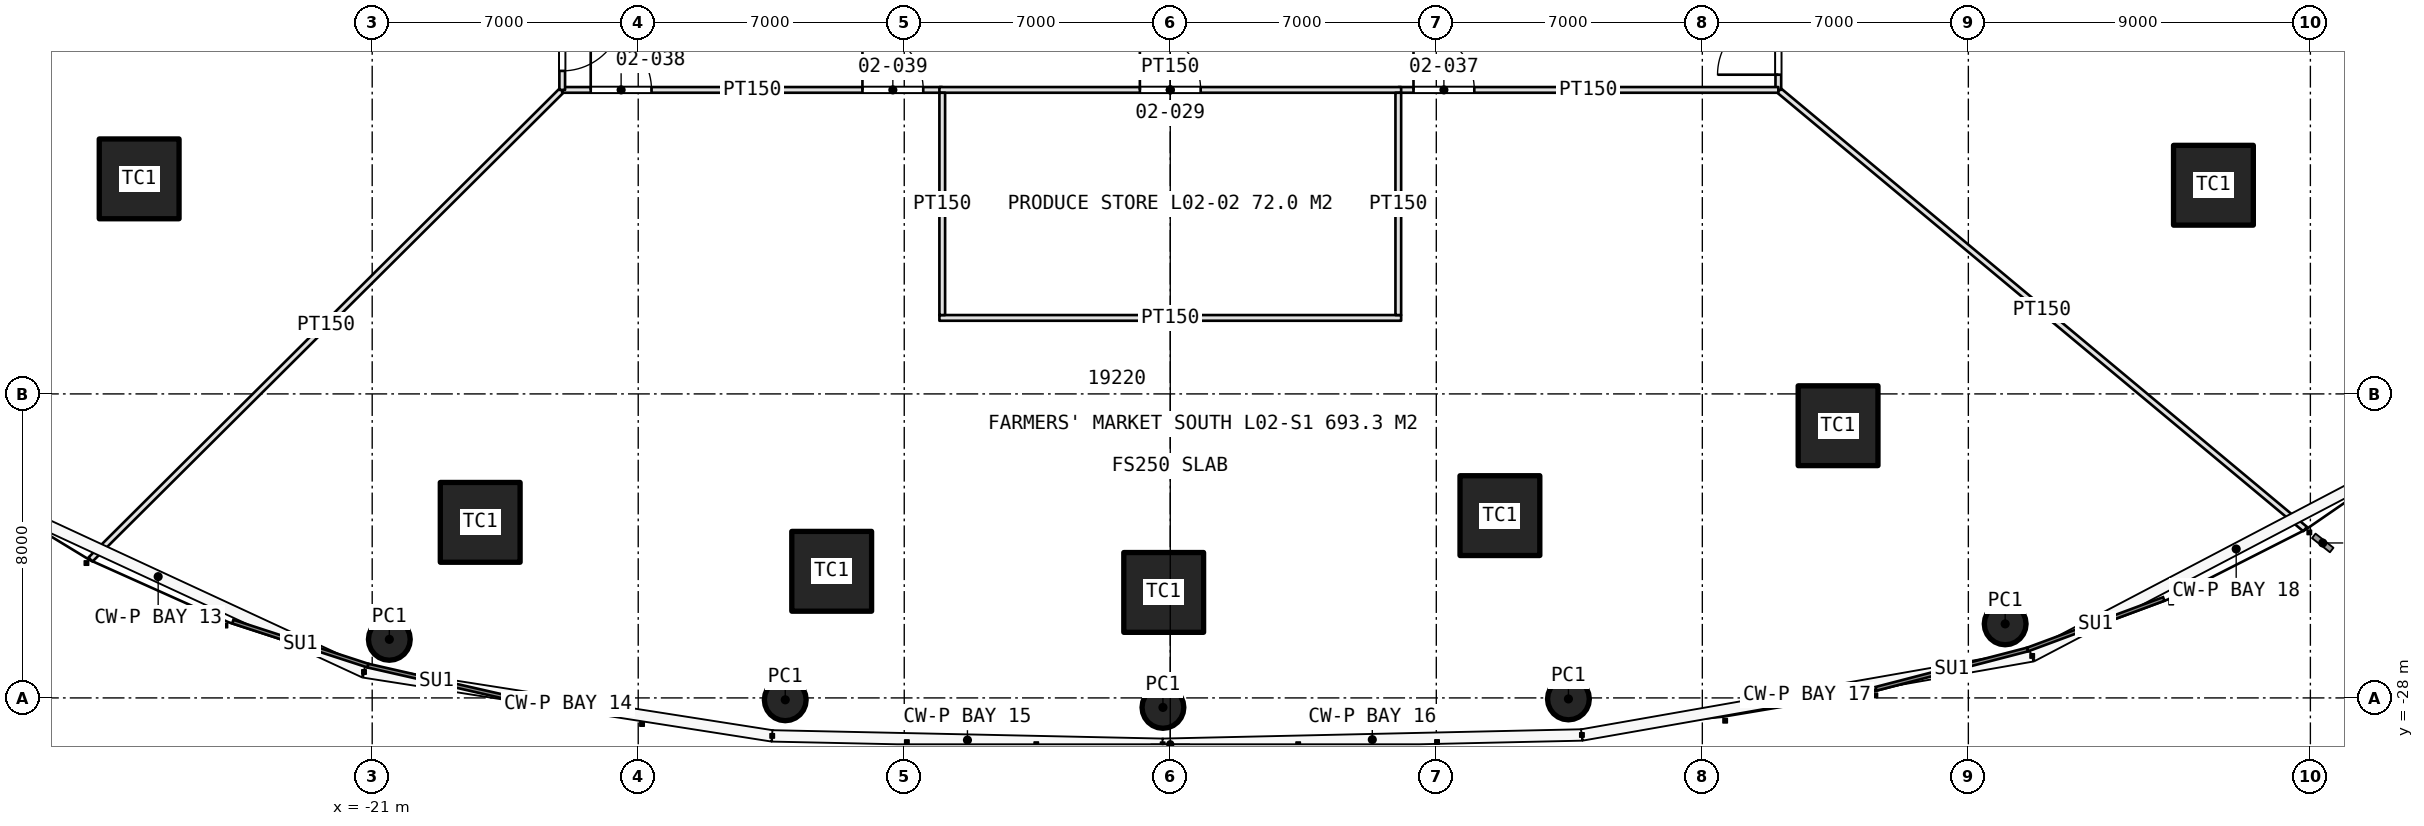
"""IFC4 building model, lengths in metres.
Left out: names, types, materials, properties, quantities, classifications, styles, units other than length and angle.
Written with IfcOpenShell. Run it as: python <this file> out.ifc"""

import sys

from ifc_helpers import new_model, si_unit, direction, frame, frame_2d, origin, origin_2d, place, context, subcontext, project, spatial, rectangle, circle, extrude, element, fill, save


model = new_model("IFC4")
c1 = context("Model", 3, precision=1e-05, world=origin(), true_north=direction((0.0, 1.0)))
c2 = subcontext(c1, "Body", "Model", "MODEL_VIEW")
j1 = project(units=[si_unit("LENGTHUNIT", "METRE"), si_unit("PLANEANGLEUNIT", "RADIAN")], contexts=[c1])
p1 = place(None, origin())
s1 = spatial("IfcSite", under=j1, at=p1, CompositionType="ELEMENT")
p2 = place(p1, origin())
s2 = spatial("IfcBuilding", under=s1, at=p2, CompositionType="ELEMENT")
p3 = place(p2, frame((0.0, 0.0, 10.0)))
s3 = spatial("IfcBuildingStorey", under=s2, at=p3, CompositionType="ELEMENT", Elevation=10.0)
for number, where, z_axis, x_axis in (
    (1, (-27.132, -14.341, 0.0), (0.0, 0.0, 1.0), (1.0, 0.0, 0.0)),
    (2, (-18.158, -23.38, 0.0), (0.0, 0.0, 1.0), (1.0, 0.0, 0.0)),
    (3, (-8.909, -24.668, 0.0), (0.0, 0.0, 1.0), (1.0, 0.0, 0.0)),
    (4, (-0.173, -25.224, 0.0), (0.0, 0.0, 1.0), (1.0, 0.0, 0.0)),
    (5, (8.674, -23.203, 0.0), (0.0, 0.0, 1.0), (1.0, 0.0, 0.0)),
    (6, (17.572, -20.837, 0.0), (0.0, 0.0, 1.0), (1.0, 0.0, 0.0)),
    (7, (27.449, -14.509, 0.0), (0.0, 0.0, 1.0), (1.0, 0.0, 0.0)),
):
    element("IfcColumn", number, at=place(p3, frame(where, z_axis=z_axis, x_axis=x_axis)), inside=s3, PredefinedType="COLUMN", context=c2, shape_type="SweptSolid", body=[
        extrude(rectangle(XDim=2.1, YDim=2.1, at=origin_2d()), origin(), (0.0, 0.0, 1.0), 5.0),
    ])
for number, where, z_axis, x_axis in (
    (8, (-20.549, -26.459, 0.0), (0.0, 0.0, 1.0), (1.0, 0.0, 0.0)),
    (9, (-10.131, -28.05, 0.0), (0.0, 0.0, 1.0), (1.0, 0.0, 0.0)),
    (10, (-0.193, -28.25, 0.0), (0.0, 0.0, 1.0), (1.0, 0.0, 0.0)),
    (11, (10.477, -28.027, 0.0), (0.0, 0.0, 1.0), (1.0, 0.0, 0.0)),
    (12, (21.969, -26.052, 0.0), (0.0, 0.0, 1.0), (1.0, 0.0, 0.0)),
):
    element("IfcColumn", number, at=place(p3, frame(where, z_axis=z_axis, x_axis=x_axis)), inside=s3, PredefinedType="COLUMN", context=c2, shape_type="SweptSolid", body=[
        extrude(circle(Radius=0.55, at=origin_2d()), origin(), (0.0, 0.0, 1.0), 5.0),
    ])
p4 = place(p3, frame((-16.014, -12.014, 0.0), z_axis=(0.0, 0.0, 1.0), x_axis=(-0.708660986583, -0.705549152147, 0.0)))
e13 = element("IfcWall", 13, at=p4, inside=s3, PredefinedType="PARTITIONING", context=c2, shape_type="SweptSolid", body=[
    extrude(rectangle(XDim=17.496, YDim=0.15, at=frame_2d((8.748, 0.0))), origin(), (0.0, 0.0, 1.0), 3.8),
])
p5 = place(p3, frame((16.015, -12.013, 0.0), z_axis=(0.0, 0.0, 1.0), x_axis=(0.768089154528, -0.640342916488, 0.0)))
e14 = element("IfcWall", 14, at=p5, inside=s3, PredefinedType="PARTITIONING", context=c2, shape_type="SweptSolid", body=[
    extrude(rectangle(XDim=18.026, YDim=0.15, at=frame_2d((9.013, 0.0))), origin(), (0.0, 0.0, 1.0), 3.8),
])
p6 = place(p3, frame((16.0, -12.0, 0.0), z_axis=(0.0, 0.0, 1.0), x_axis=(0.0, 1.0, 0.0)))
e15 = element("IfcWall", 15, at=p6, inside=s3, PredefinedType="PARTITIONING", context=c2, shape_type="SweptSolid", body=[
    extrude(rectangle(XDim=24.0, YDim=0.15, at=frame_2d((12.0, 0.0))), origin(), (0.0, 0.0, 1.0), 3.8),
])
p7 = place(p6, frame((10.4, 0.0, 0.0)))
e16 = element("IfcOpeningElement", 16, at=p7, cuts=e15, PredefinedType="OPENING", context=c2, shape_type="SweptSolid", body=[
    extrude(rectangle(XDim=1.6, YDim=2.4, at=frame_2d((0.8, 1.2))), frame((0.0, 0.085, 0.0), z_axis=(0.0, -1.0, 0.0), x_axis=(1.0, 0.0, 0.0)), (0.0, 0.0, 1.0), 0.17),
])
p8 = place(p6, frame((21.9, 0.0, 0.0)))
e17 = element("IfcOpeningElement", 17, at=p8, cuts=e15, PredefinedType="OPENING", context=c2, shape_type="SweptSolid", body=[
    extrude(rectangle(XDim=1.6, YDim=2.4, at=frame_2d((0.8, 1.2))), frame((0.0, 0.085, 0.0), z_axis=(0.0, -1.0, 0.0), x_axis=(1.0, 0.0, 0.0)), (0.0, 0.0, 1.0), 0.17),
])
p9 = place(p6, frame((0.4, 0.0, 0.0)))
e18 = element("IfcOpeningElement", 18, at=p9, cuts=e15, PredefinedType="OPENING", context=c2, shape_type="SweptSolid", body=[
    extrude(rectangle(XDim=1.6, YDim=2.4, at=frame_2d((0.8, 1.2))), frame((0.0, 0.085, 0.0), z_axis=(0.0, -1.0, 0.0), x_axis=(1.0, 0.0, 0.0)), (0.0, 0.0, 1.0), 0.17),
])
p10 = place(p3, frame((-16.0, -12.0, 0.0), z_axis=(0.0, 0.0, 1.0), x_axis=(1.0, 0.0, 0.0)))
e19 = element("IfcWall", 19, at=p10, inside=s3, PredefinedType="PARTITIONING", context=c2, shape_type="SweptSolid", body=[
    extrude(rectangle(XDim=10.0, YDim=0.15, at=frame_2d((5.0, 0.0))), origin(), (0.0, 0.0, 1.0), 3.8),
])
p11 = place(p10, frame((0.75, 0.0, 0.0)))
e20 = element("IfcOpeningElement", 20, at=p11, cuts=e19, PredefinedType="OPENING", context=c2, shape_type="SweptSolid", body=[
    extrude(rectangle(XDim=1.6, YDim=2.4, at=frame_2d((0.8, 1.2))), frame((0.0, 0.085, 0.0), z_axis=(0.0, -1.0, 0.0), x_axis=(1.0, 0.0, 0.0)), (0.0, 0.0, 1.0), 0.17),
])
p12 = place(p10, frame((7.9, 0.0, 0.0)))
e21 = element("IfcOpeningElement", 21, at=p12, cuts=e19, PredefinedType="OPENING", context=c2, shape_type="SweptSolid", body=[
    extrude(rectangle(XDim=1.6, YDim=2.4, at=frame_2d((0.8, 1.2))), frame((0.0, 0.085, 0.0), z_axis=(0.0, -1.0, 0.0), x_axis=(1.0, 0.0, 0.0)), (0.0, 0.0, 1.0), 0.17),
])
p13 = place(p3, frame((6.0, -12.0, 0.0), z_axis=(0.0, 0.0, 1.0), x_axis=(1.0, 0.0, 0.0)))
e22 = element("IfcWall", 22, at=p13, inside=s3, PredefinedType="PARTITIONING", context=c2, shape_type="SweptSolid", body=[
    extrude(rectangle(XDim=10.0, YDim=0.15, at=frame_2d((5.0, 0.0))), origin(), (0.0, 0.0, 1.0), 3.8),
])
p14 = place(p13, frame((0.4, 0.0, 0.0)))
e23 = element("IfcOpeningElement", 23, at=p14, cuts=e22, PredefinedType="OPENING", context=c2, shape_type="SweptSolid", body=[
    extrude(rectangle(XDim=1.6, YDim=2.4, at=frame_2d((0.8, 1.2))), frame((0.0, 0.085, 0.0), z_axis=(0.0, -1.0, 0.0), x_axis=(1.0, 0.0, 0.0)), (0.0, 0.0, 1.0), 0.17),
])
p15 = place(p3, frame((-16.0, 12.0, 0.0), z_axis=(0.0, 0.0, 1.0), x_axis=(0.0, -1.0, 0.0)))
e24 = element("IfcWall", 24, at=p15, inside=s3, PredefinedType="PARTITIONING", context=c2, shape_type="SweptSolid", body=[
    extrude(rectangle(XDim=24.0, YDim=0.15, at=frame_2d((12.0, 0.0))), origin(), (0.0, 0.0, 1.0), 3.8),
])
p16 = place(p15, frame((12.9, 0.0, 0.0)))
e25 = element("IfcOpeningElement", 25, at=p16, cuts=e24, PredefinedType="OPENING", context=c2, shape_type="SweptSolid", body=[
    extrude(rectangle(XDim=1.6, YDim=2.4, at=frame_2d((0.8, 1.2))), frame((0.0, 0.085, 0.0), z_axis=(0.0, -1.0, 0.0), x_axis=(1.0, 0.0, 0.0)), (0.0, 0.0, 1.0), 0.17),
])
p17 = place(p15, frame((0.4, 0.0, 0.0)))
e26 = element("IfcOpeningElement", 26, at=p17, cuts=e24, PredefinedType="OPENING", context=c2, shape_type="SweptSolid", body=[
    extrude(rectangle(XDim=1.6, YDim=2.4, at=frame_2d((0.8, 1.2))), frame((0.0, 0.085, 0.0), z_axis=(0.0, -1.0, 0.0), x_axis=(1.0, 0.0, 0.0)), (0.0, 0.0, 1.0), 0.17),
])
p18 = place(p15, frame((21.9, 0.0, 0.0)))
e27 = element("IfcOpeningElement", 27, at=p18, cuts=e24, PredefinedType="OPENING", context=c2, shape_type="SweptSolid", body=[
    extrude(rectangle(XDim=1.6, YDim=2.4, at=frame_2d((0.8, 1.2))), frame((0.0, 0.085, 0.0), z_axis=(0.0, -1.0, 0.0), x_axis=(1.0, 0.0, 0.0)), (0.0, 0.0, 1.0), 0.17),
])
p19 = place(p3, frame((-6.075, -18.0, 0.0), z_axis=(0.0, 0.0, 1.0), x_axis=(1.0, 0.0, 0.0)))
e28 = element("IfcWall", 28, at=p19, inside=s3, PredefinedType="PARTITIONING", context=c2, shape_type="SweptSolid", body=[
    extrude(rectangle(XDim=12.15, YDim=0.15, at=frame_2d((6.075, 0.0))), origin(), (0.0, 0.0, 1.0), 3.8),
])
p20 = place(p3, frame((-6.075, -12.0, 0.0), z_axis=(0.0, 0.0, 1.0), x_axis=(1.0, 0.0, 0.0)))
e29 = element("IfcWall", 29, at=p20, inside=s3, PredefinedType="PARTITIONING", context=c2, shape_type="SweptSolid", body=[
    extrude(rectangle(XDim=12.15, YDim=0.15, at=frame_2d((6.075, 0.0))), origin(), (0.0, 0.0, 1.0), 3.8),
])
p21 = place(p20, frame((5.275, 0.0, 0.0)))
e30 = element("IfcOpeningElement", 30, at=p21, cuts=e29, PredefinedType="OPENING", context=c2, shape_type="SweptSolid", body=[
    extrude(rectangle(XDim=1.6, YDim=2.4, at=frame_2d((0.8, 1.2))), frame((0.0, 0.085, 0.0), z_axis=(0.0, -1.0, 0.0), x_axis=(1.0, 0.0, 0.0)), (0.0, 0.0, 1.0), 0.17),
])
for number, where, z_axis, x_axis in (
    (31, (-6.0, -17.925, 0.0), (0.0, 0.0, 1.0), (0.0, 1.0, 0.0)),
    (32, (6.0, -17.925, 0.0), (0.0, 0.0, 1.0), (0.0, 1.0, 0.0)),
):
    element("IfcWall", number, at=place(p3, frame(where, z_axis=z_axis, x_axis=x_axis)), inside=s3, PredefinedType="PARTITIONING", context=c2, shape_type="SweptSolid", body=[
        extrude(rectangle(XDim=5.85, YDim=0.15, at=frame_2d((2.925, 0.0))), origin(), (0.0, 0.0, 1.0), 3.8),
    ])
p22 = place(p21, origin())
e33 = element("IfcDoor", 33, at=p22, inside=s3, OperationType="DOUBLE_DOOR_SINGLE_SWING", PredefinedType="DOOR", context=c2, shape_type="SweptSolid", body=[
    extrude(rectangle(XDim=1.6, YDim=2.4, at=frame_2d((0.8, 1.2))), frame((0.0, 0.025, 0.0), z_axis=(0.0, -1.0, 0.0), x_axis=(1.0, 0.0, 0.0)), (0.0, 0.0, 1.0), 0.05),
])
fill(e30, e33)
p23 = place(p9, origin())
e34 = element("IfcDoor", 34, at=p23, inside=s3, OperationType="DOUBLE_DOOR_SINGLE_SWING", PredefinedType="DOOR", context=c2, shape_type="SweptSolid", body=[
    extrude(rectangle(XDim=1.6, YDim=2.4, at=frame_2d((0.8, 1.2))), frame((0.0, 0.025, 0.0), z_axis=(0.0, -1.0, 0.0), x_axis=(1.0, 0.0, 0.0)), (0.0, 0.0, 1.0), 0.05),
])
fill(e18, e34)
p24 = place(p14, origin())
e35 = element("IfcDoor", 35, at=p24, inside=s3, OperationType="DOUBLE_DOOR_SINGLE_SWING", PredefinedType="DOOR", context=c2, shape_type="SweptSolid", body=[
    extrude(rectangle(XDim=1.6, YDim=2.4, at=frame_2d((0.8, 1.2))), frame((0.0, 0.025, 0.0), z_axis=(0.0, -1.0, 0.0), x_axis=(1.0, 0.0, 0.0)), (0.0, 0.0, 1.0), 0.05),
])
fill(e23, e35)
p25 = place(p11, origin())
e36 = element("IfcDoor", 36, at=p25, inside=s3, OperationType="DOUBLE_DOOR_SINGLE_SWING", PredefinedType="DOOR", context=c2, shape_type="SweptSolid", body=[
    extrude(rectangle(XDim=1.6, YDim=2.4, at=frame_2d((0.8, 1.2))), frame((0.0, 0.025, 0.0), z_axis=(0.0, -1.0, 0.0), x_axis=(1.0, 0.0, 0.0)), (0.0, 0.0, 1.0), 0.05),
])
fill(e20, e36)
p26 = place(p12, origin())
e37 = element("IfcDoor", 37, at=p26, inside=s3, OperationType="DOUBLE_DOOR_SINGLE_SWING", PredefinedType="DOOR", context=c2, shape_type="SweptSolid", body=[
    extrude(rectangle(XDim=1.6, YDim=2.4, at=frame_2d((0.8, 1.2))), frame((0.0, 0.025, 0.0), z_axis=(0.0, -1.0, 0.0), x_axis=(1.0, 0.0, 0.0)), (0.0, 0.0, 1.0), 0.05),
])
fill(e21, e37)
p27 = place(p18, origin())
e38 = element("IfcDoor", 38, at=p27, inside=s3, OperationType="DOUBLE_DOOR_SINGLE_SWING", PredefinedType="DOOR", context=c2, shape_type="SweptSolid", body=[
    extrude(rectangle(XDim=1.6, YDim=2.4, at=frame_2d((0.8, 1.2))), frame((0.0, 0.025, 0.0), z_axis=(0.0, -1.0, 0.0), x_axis=(1.0, 0.0, 0.0)), (0.0, 0.0, 1.0), 0.05),
])
fill(e27, e38)
save(model, sys.argv[1])
